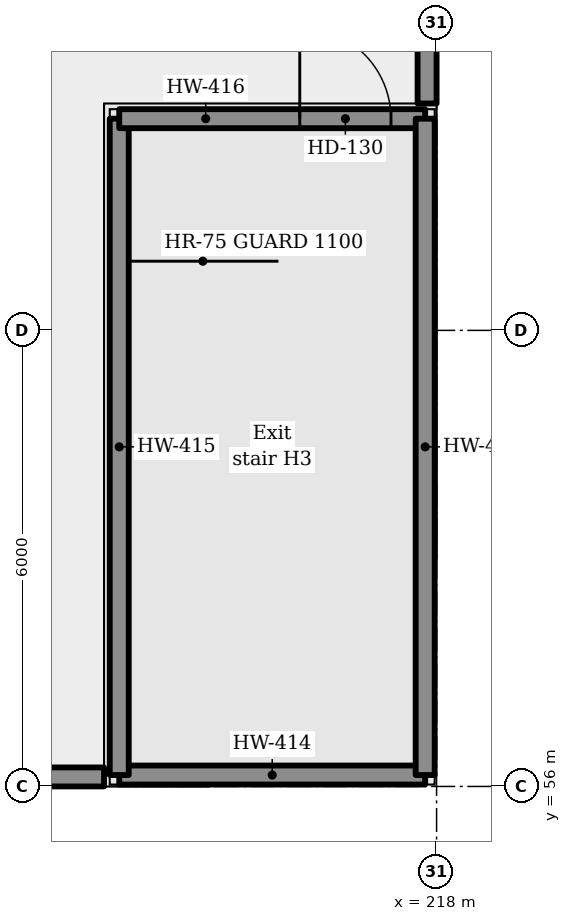
"""IFC4 building model, lengths in metres.
Left out: names, types, materials, properties, quantities, classifications, styles, units other than length and angle.
Written with IfcOpenShell. Run it as: python <this file> out.ifc"""

import sys

from ifc_helpers import new_model, si_unit, direction, frame, frame_2d, origin, place, context, subcontext, project, spatial, rectangle, extrude, element, fill, save


model = new_model("IFC4")
c1 = context("Model", 3, precision=1e-05, world=origin(), true_north=direction((0.0, 1.0)))
c2 = subcontext(c1, "Body", "Model", "MODEL_VIEW")
j1 = project(units=[si_unit("LENGTHUNIT", "METRE"), si_unit("PLANEANGLEUNIT", "RADIAN")], contexts=[c1])
p1 = place(None, origin())
s1 = spatial("IfcSite", under=j1, at=p1, CompositionType="ELEMENT")
p2 = place(p1, origin())
s2 = spatial("IfcBuilding", under=s1, at=p2, CompositionType="ELEMENT")
p3 = place(p2, frame((0.0, 0.0, 19.8)))
s3 = spatial("IfcBuildingStorey", under=s2, at=p3, CompositionType="ELEMENT", Elevation=19.8)
p4 = place(p3, frame((217.875, 95.015, 0.0), z_axis=(0.0, 0.0, 1.0), x_axis=(0.0, -1.0, 0.0)))
e1 = element("IfcWall", 1, at=p4, inside=s3, PredefinedType="PARAPET", context=c2, shape_type="SweptSolid", body=[
    extrude(rectangle(XDim=30.03, YDim=0.25, at=frame_2d((15.015, 0.0))), origin(), (0.0, 0.0, 1.0), 1.1),
])
p5 = place(p3, frame((213.625, 56.125, 0.0), z_axis=(0.0, 0.0, 1.0), x_axis=(-1.0, 0.0, 0.0)))
e2 = element("IfcWall", 2, at=p5, inside=s3, PredefinedType="PARAPET", context=c2, shape_type="SweptSolid", body=[
    extrude(rectangle(XDim=57.25, YDim=0.25, at=frame_2d((28.625, 0.0))), origin(), (0.0, 0.0, 1.0), 1.1),
])
p6 = place(p3, frame((217.85, 56.15, 0.0), z_axis=(0.0, 0.0, 1.0), x_axis=(-1.0, 0.0, 0.0)))
e3 = element("IfcWall", 3, at=p6, inside=s3, PredefinedType="SOLIDWALL", context=c2, shape_type="SweptSolid", body=[
    extrude(rectangle(XDim=4.025, YDim=0.25, at=frame_2d((2.013, 0.0))), origin(), (0.0, 0.0, 1.0), 2.75),
])
p7 = place(p3, frame((213.825, 56.15, 0.0), z_axis=(0.0, 0.0, 1.0), x_axis=(0.0, 1.0, 0.0)))
e4 = element("IfcWall", 4, at=p7, inside=s3, PredefinedType="SOLIDWALL", context=c2, shape_type="SweptSolid", body=[
    extrude(rectangle(XDim=8.635, YDim=0.25, at=frame_2d((4.317, 0.0))), origin(), (0.0, 0.0, 1.0), 2.75),
])
p8 = place(p3, frame((213.825, 64.785, 0.0), z_axis=(0.0, 0.0, 1.0), x_axis=(1.0, 0.0, 0.0)))
e5 = element("IfcWall", 5, at=p8, inside=s3, PredefinedType="SOLIDWALL", context=c2, shape_type="SweptSolid", body=[
    extrude(rectangle(XDim=4.025, YDim=0.25, at=frame_2d((2.013, 0.0))), origin(), (0.0, 0.0, 1.0), 2.75),
])
p9 = place(p8, frame((2.375, 0.0, 0.0)))
e6 = element("IfcOpeningElement", 6, at=p9, cuts=e5, PredefinedType="OPENING", context=c2, shape_type="SweptSolid", body=[
    extrude(rectangle(XDim=1.2, YDim=2.1, at=frame_2d((0.6, 1.05))), frame((0.0, 0.135, 0.0), z_axis=(0.0, -1.0, 0.0), x_axis=(1.0, 0.0, 0.0)), (0.0, 0.0, 1.0), 0.27),
])
p10 = place(p3, frame((217.85, 64.785, 0.0), z_axis=(0.0, 0.0, 1.0), x_axis=(0.0, -1.0, 0.0)))
e7 = element("IfcWall", 7, at=p10, inside=s3, PredefinedType="SOLIDWALL", context=c2, shape_type="SweptSolid", body=[
    extrude(rectangle(XDim=8.635, YDim=0.25, at=frame_2d((4.317, 0.0))), origin(), (0.0, 0.0, 1.0), 2.75),
])
p11 = place(p9, frame((1.2, 0.0, 0.0), z_axis=(0.0, 0.0, 1.0), x_axis=(-1.0, 0.0, 0.0)))
e8 = element("IfcDoor", 8, at=p11, inside=s3, OperationType="SINGLE_SWING_LEFT", PredefinedType="DOOR", context=c2, shape_type="SweptSolid", body=[
    extrude(rectangle(XDim=1.2, YDim=2.1, at=frame_2d((0.6, 1.05))), frame((0.0, 0.025, 0.0), z_axis=(0.0, -1.0, 0.0), x_axis=(1.0, 0.0, 0.0)), (0.0, 0.0, 1.0), 0.05),
])
fill(e6, e8)
save(model, sys.argv[1])
